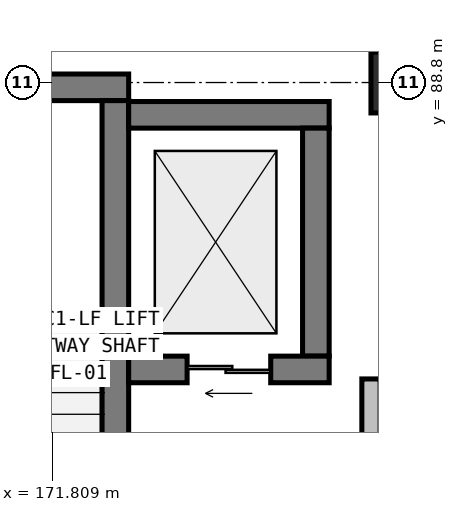
"""IFC4 building model, lengths in metres.
Left out: names, types, materials, properties, quantities, classifications, styles, units other than length and angle.
Written with IfcOpenShell. Run it as: python <this file> out.ifc"""

import sys

from ifc_helpers import new_model, si_unit, direction, frame, frame_2d, origin, origin_2d, place, context, subcontext, project, spatial, rectangle, extrude, element, fill, save


model = new_model("IFC4")
c1 = context("Model", 3, precision=1e-05, world=origin(), true_north=direction((0.0, 1.0)))
c2 = subcontext(c1, "Body", "Model", "MODEL_VIEW")
j1 = project(units=[si_unit("LENGTHUNIT", "METRE"), si_unit("PLANEANGLEUNIT", "RADIAN")], contexts=[c1])
p1 = place(None, origin())
s1 = spatial("IfcSite", under=j1, at=p1, CompositionType="ELEMENT")
p2 = place(p1, origin())
s2 = spatial("IfcBuilding", under=s1, at=p2, CompositionType="ELEMENT")
p3 = place(p2, frame((0.0, 0.0, -5.4)))
s3 = spatial("IfcBuildingStorey", under=s2, at=p3, CompositionType="ELEMENT", Elevation=-5.4)
p4 = place(p3, frame((176.4, 88.8, 0.0), z_axis=(0.0, 0.0, 1.0), x_axis=(1.0, 0.0, 0.0)))
e1 = element("IfcColumn", 1, at=p4, inside=s3, PredefinedType="COLUMN", context=c2, shape_type="SweptSolid", body=[
    extrude(rectangle(XDim=0.8, YDim=0.8, at=origin_2d()), origin(), (0.0, 0.0, 1.0), 5.4),
])
p5 = place(p3, frame((168.188, 88.737, 0.0), z_axis=(0.0, 0.0, 1.0), x_axis=(1.0, 0.0, 0.0)))
e2 = element("IfcWall", 2, at=p5, inside=s3, PredefinedType="SHEAR", context=c2, shape_type="SweptSolid", body=[
    extrude(rectangle(XDim=4.624, YDim=0.35, at=frame_2d((2.312, 0.0))), origin(), (0.0, 0.0, 1.0), 5.06),
])
p6 = place(p3, frame((172.637, 88.562, 0.0), z_axis=(0.0, 0.0, 1.0), x_axis=(0.0, -1.0, 0.0)))
e3 = element("IfcWall", 3, at=p6, inside=s3, PredefinedType="SHEAR", context=c2, shape_type="SweptSolid", body=[
    extrude(rectangle(XDim=9.124, YDim=0.35, at=frame_2d((4.562, 0.0))), origin(), (0.0, 0.0, 1.0), 5.06),
])
p7 = place(p3, frame((172.812, 88.375, 0.0), z_axis=(0.0, 0.0, 1.0), x_axis=(1.0, 0.0, 0.0)))
e4 = element("IfcWall", 4, at=p7, inside=s3, PredefinedType="SHEAR", context=c2, shape_type="SweptSolid", body=[
    extrude(rectangle(XDim=2.638, YDim=0.35, at=frame_2d((1.319, 0.0))), origin(), (0.0, 0.0, 1.0), 5.06),
])
p8 = place(p3, frame((175.275, 88.2, 0.0), z_axis=(0.0, 0.0, 1.0), x_axis=(0.0, -1.0, 0.0)))
e5 = element("IfcWall", 5, at=p8, inside=s3, PredefinedType="SHEAR", context=c2, shape_type="SweptSolid", body=[
    extrude(rectangle(XDim=3.0, YDim=0.35, at=frame_2d((1.5, 0.0))), origin(), (0.0, 0.0, 1.0), 5.06),
])
p9 = place(p3, frame((175.45, 85.025, 0.0), z_axis=(0.0, 0.0, 1.0), x_axis=(-1.0, 0.0, 0.0)))
e6 = element("IfcWall", 6, at=p9, inside=s3, PredefinedType="SHEAR", context=c2, shape_type="SweptSolid", body=[
    extrude(rectangle(XDim=2.638, YDim=0.35, at=frame_2d((1.319, 0.0))), origin(), (0.0, 0.0, 1.0), 5.06),
])
p10 = place(p9, frame((0.769, 0.0, 0.0)))
e7 = element("IfcOpeningElement", 7, at=p10, cuts=e6, PredefinedType="OPENING", context=c2, shape_type="SweptSolid", body=[
    extrude(rectangle(XDim=1.1, YDim=2.2, at=frame_2d((0.55, 1.1))), frame((0.0, 0.185, 0.0), z_axis=(0.0, -1.0, 0.0), x_axis=(1.0, 0.0, 0.0)), (0.0, 0.0, 1.0), 0.37),
])
p11 = place(p3, frame((176.0, 84.9, 0.0), z_axis=(0.0, 0.0, 1.0), x_axis=(0.0, -1.0, 0.0)))
e8 = element("IfcWall", 8, at=p11, inside=s3, PredefinedType="PARTITIONING", context=c2, shape_type="SweptSolid", body=[
    extrude(rectangle(XDim=5.5, YDim=0.24, at=frame_2d((2.75, 0.0))), origin(), (0.0, 0.0, 1.0), 4.385),
])
p12 = place(p10, origin())
e9 = element("IfcDoor", 9, at=p12, inside=s3, OperationType="DOUBLE_DOOR_SLIDING", PredefinedType="DOOR", context=c2, shape_type="SweptSolid", body=[
    extrude(rectangle(XDim=1.1, YDim=2.2, at=frame_2d((0.55, 1.1))), frame((0.0, 0.025, 0.0), z_axis=(0.0, -1.0, 0.0), x_axis=(1.0, 0.0, 0.0)), (0.0, 0.0, 1.0), 0.05),
])
fill(e7, e9)
save(model, sys.argv[1])
